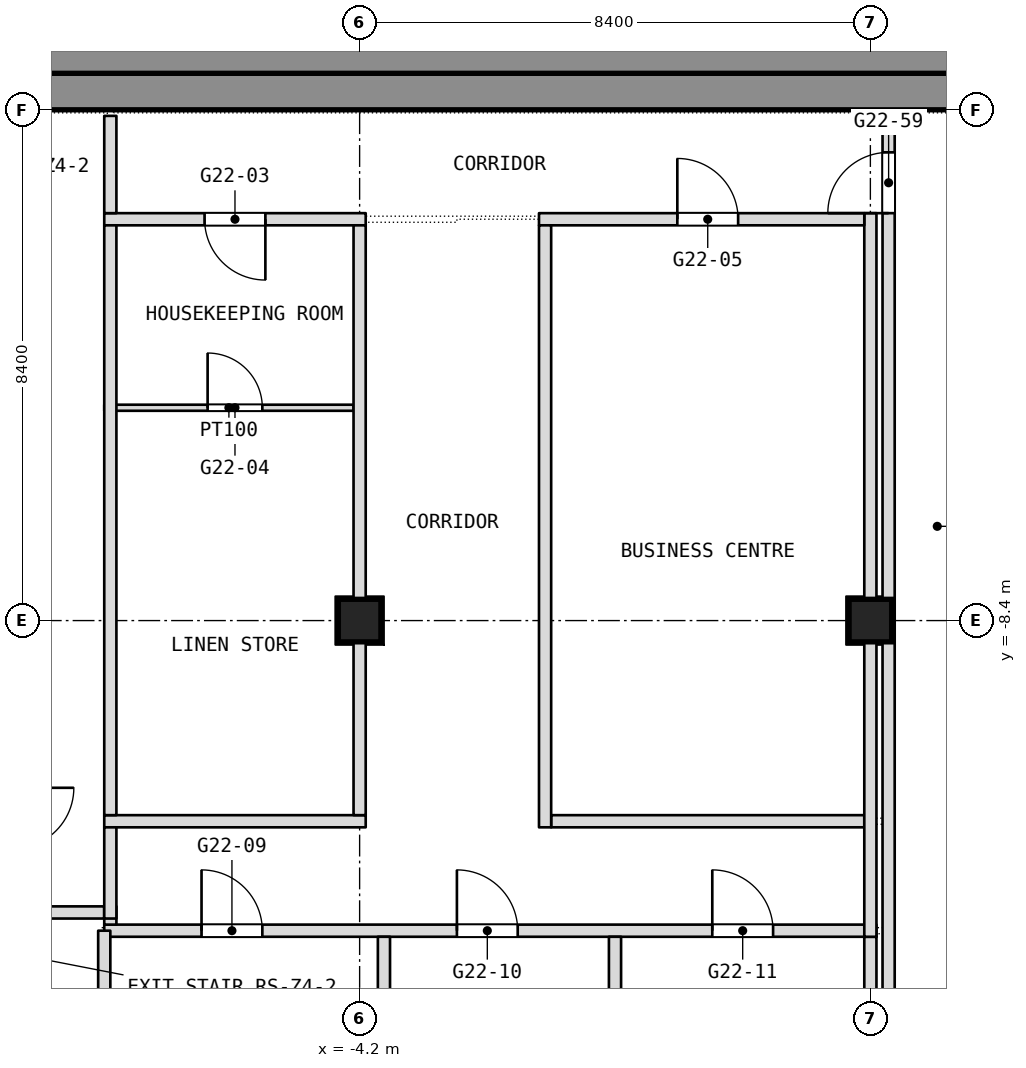
"""IFC4 building model, lengths in metres.
Left out: names, types, materials, properties, quantities, classifications, styles, units other than length and angle.
Written with IfcOpenShell. Run it as: python <this file> out.ifc"""

import sys

from ifc_helpers import new_model, si_unit, direction, frame, frame_2d, origin, origin_2d, place, context, subcontext, project, spatial, rectangle, extrude, element, fill, save


model = new_model("IFC4")
c1 = context("Model", 3, precision=1e-05, world=origin(), true_north=direction((0.0, 1.0)))
c2 = subcontext(c1, "Body", "Model", "MODEL_VIEW")
j1 = project(units=[si_unit("LENGTHUNIT", "METRE"), si_unit("PLANEANGLEUNIT", "RADIAN")], contexts=[c1])
p1 = place(None, origin())
s1 = spatial("IfcSite", under=j1, at=p1, CompositionType="ELEMENT")
p2 = place(p1, origin())
s2 = spatial("IfcBuilding", under=s1, at=p2, CompositionType="ELEMENT")
p3 = place(p2, frame((0.0, 0.0, 266.9)))
s3 = spatial("IfcBuildingStorey", under=s2, at=p3, CompositionType="ELEMENT", Elevation=266.9)
p4 = place(p3, frame((-11.1, 0.3, 0.0), z_axis=(0.0, 0.0, 1.0), x_axis=(1.0, 0.0, 0.0)))
e1 = element("IfcWall", 1, at=p4, inside=s3, PredefinedType="SHEAR", context=c2, shape_type="SweptSolid", body=[
    extrude(rectangle(XDim=22.2, YDim=0.6, at=frame_2d((11.1, 0.0))), origin(), (0.0, 0.0, 1.0), 3.6),
])
p5 = place(p3, frame((-4.2, 0.6, 0.0), z_axis=(0.0, 0.0, 1.0), x_axis=(0.0, 1.0, 0.0)))
e2 = element("IfcWall", 2, at=p5, inside=s3, PredefinedType="SHEAR", context=c2, shape_type="SweptSolid", body=[
    extrude(rectangle(XDim=15.6, YDim=0.35, at=frame_2d((7.8, 0.0))), origin(), (0.0, 0.0, 1.0), 3.6),
])
p6 = place(p5, frame((8.7, 0.0, 0.0)))
e3 = element("IfcOpeningElement", 3, at=p6, cuts=e2, PredefinedType="OPENING", context=c2, shape_type="SweptSolid", body=[
    extrude(rectangle(XDim=1.2, YDim=2.1, at=frame_2d((0.6, 1.05))), frame((0.0, 0.175, 0.0), z_axis=(0.0, -1.0, 0.0), x_axis=(1.0, 0.0, 0.0)), (0.0, 0.0, 1.0), 0.35),
])
p7 = place(p3, frame((4.2, 0.6, 0.0), z_axis=(0.0, 0.0, 1.0), x_axis=(0.0, 1.0, 0.0)))
e4 = element("IfcWall", 4, at=p7, inside=s3, PredefinedType="SHEAR", context=c2, shape_type="SweptSolid", body=[
    extrude(rectangle(XDim=15.6, YDim=0.35, at=frame_2d((7.8, 0.0))), origin(), (0.0, 0.0, 1.0), 3.6),
])
p8 = place(p7, frame((6.15, 0.0, 0.0)))
e5 = element("IfcOpeningElement", 5, at=p8, cuts=e4, PredefinedType="OPENING", context=c2, shape_type="SweptSolid", body=[
    extrude(rectangle(XDim=1.2, YDim=2.1, at=frame_2d((0.6, 1.05))), frame((0.0, 0.175, 0.0), z_axis=(0.0, -1.0, 0.0), x_axis=(1.0, 0.0, 0.0)), (0.0, 0.0, 1.0), 0.35),
])
for number, where, z_axis, x_axis in (
    (6, (-4.2, -8.4, 0.0), (0.0, 0.0, 1.0), (1.0, 0.0, 0.0)),
    (7, (4.2, -8.4, 0.0), (0.0, 0.0, 1.0), (1.0, 0.0, 0.0)),
):
    element("IfcColumn", number, at=place(p3, frame(where, z_axis=z_axis, x_axis=x_axis)), inside=s3, PredefinedType="COLUMN", context=c2, shape_type="SweptSolid", body=[
        extrude(rectangle(XDim=0.7, YDim=0.7, at=origin_2d()), origin(), (0.0, 0.0, 1.0), 3.6),
    ])
p9 = place(p3, frame((-8.4, -13.5, 0.0), z_axis=(0.0, 0.0, 1.0), x_axis=(1.0, 0.0, 0.0)))
e8 = element("IfcWall", 8, at=p9, inside=s3, PredefinedType="PARTITIONING", context=c2, shape_type="SweptSolid", body=[
    extrude(rectangle(XDim=12.7, YDim=0.2, at=frame_2d((6.35, 0.0))), origin(), (0.0, 0.0, 1.0), 3.34),
])
p10 = place(p9, frame((1.6, 0.0, 0.0)))
e9 = element("IfcOpeningElement", 9, at=p10, cuts=e8, PredefinedType="OPENING", context=c2, shape_type="SweptSolid", body=[
    extrude(rectangle(XDim=1.0, YDim=2.1, at=frame_2d((0.5, 1.05))), frame((0.0, 0.1, 0.0), z_axis=(0.0, -1.0, 0.0), x_axis=(1.0, 0.0, 0.0)), (0.0, 0.0, 1.0), 0.2),
])
p11 = place(p9, frame((5.8, 0.0, 0.0)))
e10 = element("IfcOpeningElement", 10, at=p11, cuts=e8, PredefinedType="OPENING", context=c2, shape_type="SweptSolid", body=[
    extrude(rectangle(XDim=1.0, YDim=2.1, at=frame_2d((0.5, 1.05))), frame((0.0, 0.1, 0.0), z_axis=(0.0, -1.0, 0.0), x_axis=(1.0, 0.0, 0.0)), (0.0, 0.0, 1.0), 0.2),
])
p12 = place(p9, frame((10.0, 0.0, 0.0)))
e11 = element("IfcOpeningElement", 11, at=p12, cuts=e8, PredefinedType="OPENING", context=c2, shape_type="SweptSolid", body=[
    extrude(rectangle(XDim=1.0, YDim=2.1, at=frame_2d((0.5, 1.05))), frame((0.0, 0.1, 0.0), z_axis=(0.0, -1.0, 0.0), x_axis=(1.0, 0.0, 0.0)), (0.0, 0.0, 1.0), 0.2),
])
p13 = place(p3, frame((-9.8, -13.2, 0.0), z_axis=(0.0, 0.0, 1.0), x_axis=(1.0, 0.0, 0.0)))
e12 = element("IfcWall", 12, at=p13, inside=s3, PredefinedType="PARTITIONING", context=c2, shape_type="SweptSolid", body=[
    extrude(rectangle(XDim=1.4, YDim=0.2, at=frame_2d((0.7, 0.0))), origin(), (0.0, 0.0, 1.0), 3.34),
])
p14 = place(p3, frame((-8.4, -11.7, 0.0), z_axis=(0.0, 0.0, 1.0), x_axis=(1.0, 0.0, 0.0)))
e13 = element("IfcWall", 13, at=p14, inside=s3, PredefinedType="PARTITIONING", context=c2, shape_type="SweptSolid", body=[
    extrude(rectangle(XDim=4.3, YDim=0.2, at=frame_2d((2.15, 0.0))), origin(), (0.0, 0.0, 1.0), 3.34),
])
p15 = place(p3, frame((-1.05, -11.7, 0.0), z_axis=(0.0, 0.0, 1.0), x_axis=(1.0, 0.0, 0.0)))
e14 = element("IfcWall", 14, at=p15, inside=s3, PredefinedType="PARTITIONING", context=c2, shape_type="SweptSolid", body=[
    extrude(rectangle(XDim=5.15, YDim=0.2, at=frame_2d((2.575, 0.0))), origin(), (0.0, 0.0, 1.0), 3.34),
])
p16 = place(p3, frame((-8.4, -4.9, 0.0), z_axis=(0.0, 0.0, 1.0), x_axis=(1.0, 0.0, 0.0)))
e15 = element("IfcWall", 15, at=p16, inside=s3, PredefinedType="PARTITIONING", context=c2, shape_type="SweptSolid", body=[
    extrude(rectangle(XDim=4.1, YDim=0.1, at=frame_2d((2.05, 0.0))), origin(), (0.0, 0.0, 1.0), 3.34),
])
p17 = place(p16, frame((1.7, 0.0, 0.0)))
e16 = element("IfcOpeningElement", 16, at=p17, cuts=e15, PredefinedType="OPENING", context=c2, shape_type="SweptSolid", body=[
    extrude(rectangle(XDim=0.9, YDim=2.1, at=frame_2d((0.45, 1.05))), frame((0.0, 0.05, 0.0), z_axis=(0.0, -1.0, 0.0), x_axis=(1.0, 0.0, 0.0)), (0.0, 0.0, 1.0), 0.1),
])
p18 = place(p3, frame((4.5, -19.3, 0.0), z_axis=(0.0, 0.0, 1.0), x_axis=(0.0, 1.0, 0.0)))
e17 = element("IfcWall", 17, at=p18, inside=s3, PredefinedType="PARTITIONING", context=c2, shape_type="SweptSolid", body=[
    extrude(rectangle(XDim=19.2, YDim=0.2, at=frame_2d((9.6, 0.0))), origin(), (0.0, 0.0, 1.0), 3.34),
])
p19 = place(p18, frame((17.6, 0.0, 0.0)))
e18 = element("IfcOpeningElement", 18, at=p19, cuts=e17, PredefinedType="OPENING", context=c2, shape_type="SweptSolid", body=[
    extrude(rectangle(XDim=1.0, YDim=2.1, at=frame_2d((0.5, 1.05))), frame((0.0, 0.1, 0.0), z_axis=(0.0, -1.0, 0.0), x_axis=(1.0, 0.0, 0.0)), (0.0, 0.0, 1.0), 0.2),
])
p20 = place(p3, frame((4.2, -22.0, 0.0), z_axis=(0.0, 0.0, 1.0), x_axis=(0.0, 1.0, 0.0)))
e19 = element("IfcWall", 19, at=p20, inside=s3, PredefinedType="PARTITIONING", context=c2, shape_type="SweptSolid", body=[
    extrude(rectangle(XDim=8.4, YDim=0.2, at=frame_2d((4.2, 0.0))), origin(), (0.0, 0.0, 1.0), 3.34),
])
p21 = place(p20, frame((0.25, 0.0, 0.0)))
e20 = element("IfcOpeningElement", 20, at=p21, cuts=e19, PredefinedType="OPENING", context=c2, shape_type="SweptSolid", body=[
    extrude(rectangle(XDim=1.5, YDim=2.1, at=frame_2d((0.75, 1.05))), frame((0.0, 0.1, 0.0), z_axis=(0.0, -1.0, 0.0), x_axis=(1.0, 0.0, 0.0)), (0.0, 0.0, 1.0), 0.2),
])
p22 = place(p3, frame((4.2, -13.6, 0.0), z_axis=(0.0, 0.0, 1.0), x_axis=(0.0, 1.0, 0.0)))
e21 = element("IfcWall", 21, at=p22, inside=s3, PredefinedType="PARTITIONING", context=c2, shape_type="SweptSolid", body=[
    extrude(rectangle(XDim=11.9, YDim=0.2, at=frame_2d((5.95, 0.0))), origin(), (0.0, 0.0, 1.0), 3.34),
])
p23 = place(p3, frame((-8.4, -1.8, 0.0), z_axis=(0.0, 0.0, 1.0), x_axis=(1.0, 0.0, 0.0)))
e22 = element("IfcWall", 22, at=p23, inside=s3, PredefinedType="PARTITIONING", context=c2, shape_type="SweptSolid", body=[
    extrude(rectangle(XDim=4.3, YDim=0.2, at=frame_2d((2.15, 0.0))), origin(), (0.0, 0.0, 1.0), 3.34),
])
p24 = place(p23, frame((1.65, 0.0, 0.0)))
e23 = element("IfcOpeningElement", 23, at=p24, cuts=e22, PredefinedType="OPENING", context=c2, shape_type="SweptSolid", body=[
    extrude(rectangle(XDim=1.0, YDim=2.1, at=frame_2d((0.5, 1.05))), frame((0.0, 0.1, 0.0), z_axis=(0.0, -1.0, 0.0), x_axis=(1.0, 0.0, 0.0)), (0.0, 0.0, 1.0), 0.2),
])
p25 = place(p3, frame((-1.25, -1.8, 0.0), z_axis=(0.0, 0.0, 1.0), x_axis=(1.0, 0.0, 0.0)))
e24 = element("IfcWall", 24, at=p25, inside=s3, PredefinedType="PARTITIONING", context=c2, shape_type="SweptSolid", body=[
    extrude(rectangle(XDim=5.35, YDim=0.2, at=frame_2d((2.675, 0.0))), origin(), (0.0, 0.0, 1.0), 3.34),
])
p26 = place(p25, frame((2.275, 0.0, 0.0)))
e25 = element("IfcOpeningElement", 25, at=p26, cuts=e24, PredefinedType="OPENING", context=c2, shape_type="SweptSolid", body=[
    extrude(rectangle(XDim=1.0, YDim=2.1, at=frame_2d((0.5, 1.05))), frame((0.0, 0.1, 0.0), z_axis=(0.0, -1.0, 0.0), x_axis=(1.0, 0.0, 0.0)), (0.0, 0.0, 1.0), 0.2),
])
p27 = place(p3, frame((0.0, -20.0, 0.0), z_axis=(0.0, 0.0, 1.0), x_axis=(0.0, 1.0, 0.0)))
e26 = element("IfcWall", 26, at=p27, inside=s3, PredefinedType="PARTITIONING", context=c2, shape_type="SweptSolid", body=[
    extrude(rectangle(XDim=6.4, YDim=0.2, at=frame_2d((3.2, 0.0))), origin(), (0.0, 0.0, 1.0), 3.34),
])
p28 = place(p3, frame((-1.15, -11.8, 0.0), z_axis=(0.0, 0.0, 1.0), x_axis=(0.0, 1.0, 0.0)))
e27 = element("IfcWall", 27, at=p28, inside=s3, PredefinedType="PARTITIONING", context=c2, shape_type="SweptSolid", body=[
    extrude(rectangle(XDim=9.9, YDim=0.2, at=frame_2d((4.95, 0.0))), origin(), (0.0, 0.0, 1.0), 3.34),
])
p29 = place(p3, frame((-3.8, -20.0, 0.0), z_axis=(0.0, 0.0, 1.0), x_axis=(0.0, 1.0, 0.0)))
e28 = element("IfcWall", 28, at=p29, inside=s3, PredefinedType="PARTITIONING", context=c2, shape_type="SweptSolid", body=[
    extrude(rectangle(XDim=6.4, YDim=0.2, at=frame_2d((3.2, 0.0))), origin(), (0.0, 0.0, 1.0), 3.34),
])
p30 = place(p3, frame((-4.2, -11.6, 0.0), z_axis=(0.0, 0.0, 1.0), x_axis=(0.0, 1.0, 0.0)))
e29 = element("IfcWall", 29, at=p30, inside=s3, PredefinedType="PARTITIONING", context=c2, shape_type="SweptSolid", body=[
    extrude(rectangle(XDim=9.7, YDim=0.2, at=frame_2d((4.85, 0.0))), origin(), (0.0, 0.0, 1.0), 3.34),
])
p31 = place(p3, frame((-8.3, -13.4, 0.0), z_axis=(0.0, 0.0, 1.0), x_axis=(0.0, 1.0, 0.0)))
e30 = element("IfcWall", 30, at=p31, inside=s3, PredefinedType="PARTITIONING", context=c2, shape_type="SweptSolid", body=[
    extrude(rectangle(XDim=0.3, YDim=0.2, at=frame_2d((0.15, 0.0))), origin(), (0.0, 0.0, 1.0), 3.34),
])
p32 = place(p3, frame((-8.3, -13.3, 0.0), z_axis=(0.0, 0.0, 1.0), x_axis=(0.0, 1.0, 0.0)))
e31 = element("IfcWall", 31, at=p32, inside=s3, PredefinedType="PARTITIONING", context=c2, shape_type="SweptSolid", body=[
    extrude(rectangle(XDim=1.5, YDim=0.2, at=frame_2d((0.75, 0.0))), origin(), (0.0, 0.0, 1.0), 3.34),
])
p33 = place(p3, frame((-8.3, -1.7, 0.0), z_axis=(0.0, 0.0, 1.0), x_axis=(0.0, 1.0, 0.0)))
e32 = element("IfcWall", 32, at=p33, inside=s3, PredefinedType="PARTITIONING", context=c2, shape_type="SweptSolid", body=[
    extrude(rectangle(XDim=1.6, YDim=0.2, at=frame_2d((0.8, 0.0))), origin(), (0.0, 0.0, 1.0), 3.34),
])
p34 = place(p3, frame((-8.3, -11.6, 0.0), z_axis=(0.0, 0.0, 1.0), x_axis=(0.0, 1.0, 0.0)))
e33 = element("IfcWall", 33, at=p34, inside=s3, PredefinedType="PARTITIONING", context=c2, shape_type="SweptSolid", body=[
    extrude(rectangle(XDim=9.7, YDim=0.2, at=frame_2d((4.85, 0.0))), origin(), (0.0, 0.0, 1.0), 3.34),
])
p35 = place(p3, frame((-8.4, -20.0, 0.0), z_axis=(0.0, 0.0, 1.0), x_axis=(0.0, 1.0, 0.0)))
e34 = element("IfcWall", 34, at=p35, inside=s3, PredefinedType="PARTITIONING", context=c2, shape_type="SweptSolid", body=[
    extrude(rectangle(XDim=6.5, YDim=0.2, at=frame_2d((3.25, 0.0))), origin(), (0.0, 0.0, 1.0), 3.34),
])
p36 = place(p3, frame((-11.1, 1.05, 0.0), z_axis=(0.0, 0.0, 1.0), x_axis=(1.0, 0.0, 0.0)))
e35 = element("IfcWall", 35, at=p36, inside=s3, PredefinedType="PARTITIONING", context=c2, shape_type="SweptSolid", body=[
    extrude(rectangle(XDim=22.2, YDim=0.9, at=frame_2d((11.1, 0.0))), origin(), (0.0, 0.0, 1.0), 3.34),
])
p37 = place(p10, origin())
e36 = element("IfcDoor", 36, at=p37, inside=s3, OperationType="SINGLE_SWING_LEFT", PredefinedType="DOOR", context=c2, shape_type="SweptSolid", body=[
    extrude(rectangle(XDim=1.0, YDim=2.1, at=frame_2d((0.5, 1.05))), frame((0.0, 0.025, 0.0), z_axis=(0.0, -1.0, 0.0), x_axis=(1.0, 0.0, 0.0)), (0.0, 0.0, 1.0), 0.05),
])
fill(e9, e36)
p38 = place(p11, origin())
e37 = element("IfcDoor", 37, at=p38, inside=s3, OperationType="SINGLE_SWING_LEFT", PredefinedType="DOOR", context=c2, shape_type="SweptSolid", body=[
    extrude(rectangle(XDim=1.0, YDim=2.1, at=frame_2d((0.5, 1.05))), frame((0.0, 0.025, 0.0), z_axis=(0.0, -1.0, 0.0), x_axis=(1.0, 0.0, 0.0)), (0.0, 0.0, 1.0), 0.05),
])
fill(e10, e37)
p39 = place(p12, origin())
e38 = element("IfcDoor", 38, at=p39, inside=s3, OperationType="SINGLE_SWING_RIGHT", PredefinedType="DOOR", context=c2, shape_type="SweptSolid", body=[
    extrude(rectangle(XDim=1.0, YDim=2.1, at=frame_2d((0.5, 1.05))), frame((0.0, 0.025, 0.0), z_axis=(0.0, -1.0, 0.0), x_axis=(1.0, 0.0, 0.0)), (0.0, 0.0, 1.0), 0.05),
])
fill(e11, e38)
p40 = place(p17, origin())
e39 = element("IfcDoor", 39, at=p40, inside=s3, OperationType="SINGLE_SWING_RIGHT", PredefinedType="DOOR", context=c2, shape_type="SweptSolid", body=[
    extrude(rectangle(XDim=0.9, YDim=2.1, at=frame_2d((0.45, 1.05))), frame((0.0, 0.025, 0.0), z_axis=(0.0, -1.0, 0.0), x_axis=(1.0, 0.0, 0.0)), (0.0, 0.0, 1.0), 0.05),
])
fill(e16, e39)
p41 = place(p19, origin())
e40 = element("IfcDoor", 40, at=p41, inside=s3, OperationType="SINGLE_SWING_RIGHT", PredefinedType="DOOR", context=c2, shape_type="SweptSolid", body=[
    extrude(rectangle(XDim=1.0, YDim=2.1, at=frame_2d((0.5, 1.05))), frame((0.0, 0.025, 0.0), z_axis=(0.0, -1.0, 0.0), x_axis=(1.0, 0.0, 0.0)), (0.0, 0.0, 1.0), 0.05),
])
fill(e18, e40)
p42 = place(p24, origin())
e41 = element("IfcDoor", 41, at=p42, inside=s3, OperationType="SINGLE_SWING_LEFT", PredefinedType="DOOR", context=c2, shape_type="SweptSolid", body=[
    extrude(rectangle(XDim=1.0, YDim=2.1, at=frame_2d((0.5, 1.05))), frame((0.0, 0.025, 0.0), z_axis=(0.0, -1.0, 0.0), x_axis=(1.0, 0.0, 0.0)), (0.0, 0.0, 1.0), 0.05),
])
fill(e23, e41)
p43 = place(p26, origin())
e42 = element("IfcDoor", 42, at=p43, inside=s3, OperationType="SINGLE_SWING_LEFT", PredefinedType="DOOR", context=c2, shape_type="SweptSolid", body=[
    extrude(rectangle(XDim=1.0, YDim=2.1, at=frame_2d((0.5, 1.05))), frame((0.0, 0.025, 0.0), z_axis=(0.0, -1.0, 0.0), x_axis=(1.0, 0.0, 0.0)), (0.0, 0.0, 1.0), 0.05),
])
fill(e25, e42)
save(model, sys.argv[1])
